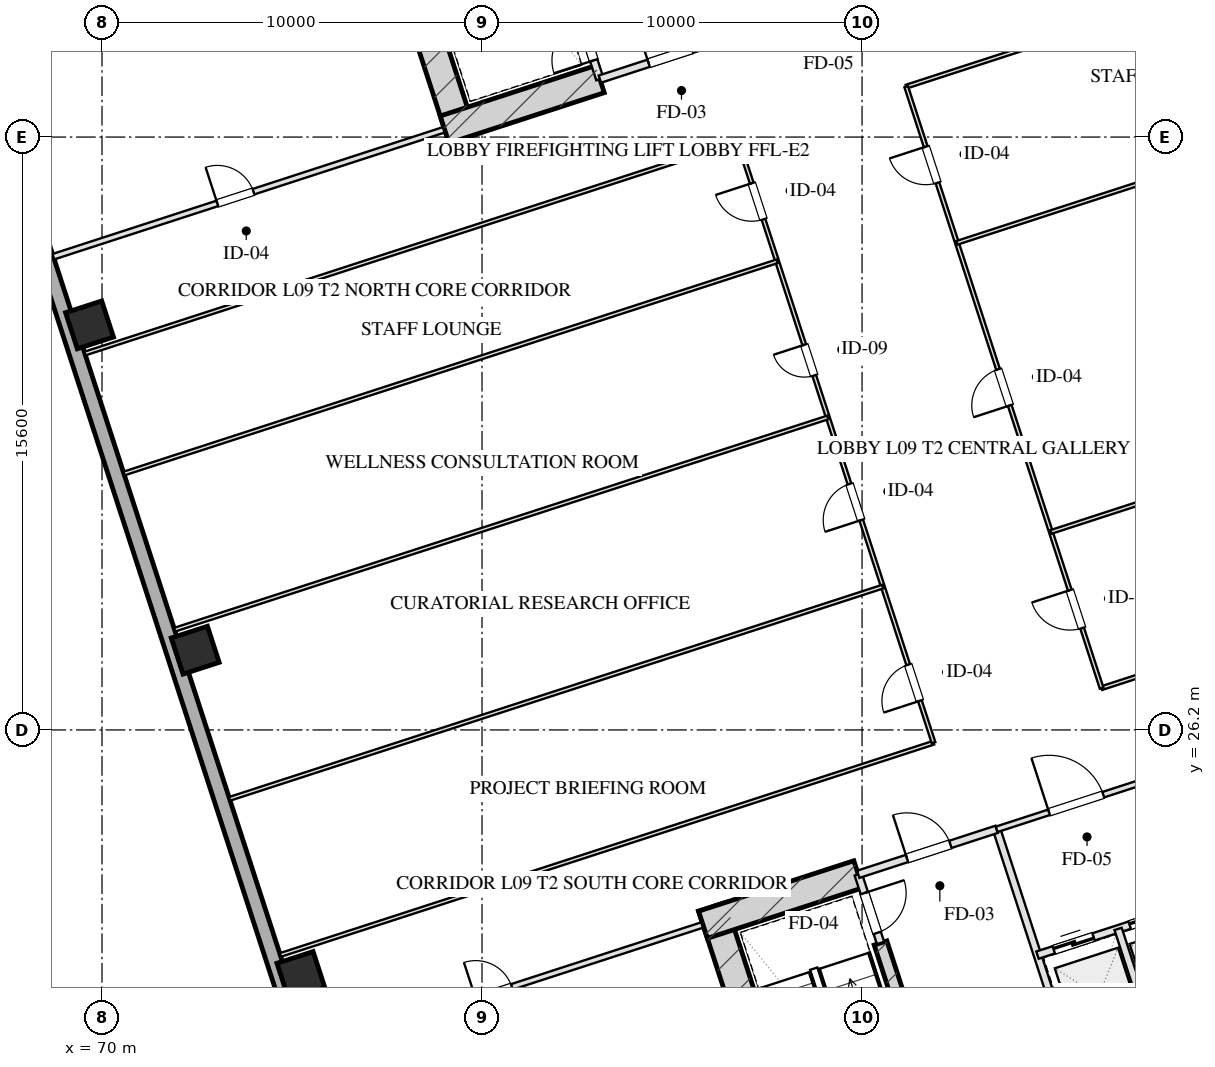
"""IFC4 building model, lengths in metres.
Left out: names, types, materials, properties, quantities, classifications, styles, units other than length and angle.
Written with IfcOpenShell. Run it as: python <this file> out.ifc"""

import sys

from ifc_helpers import new_model, si_unit, direction, frame, frame_2d, origin, origin_2d, place, context, subcontext, project, spatial, rectangle, hollow_rectangle, extrude, element, fill, save


model = new_model("IFC4")
c1 = context("Model", 3, precision=1e-05, world=origin(), true_north=direction((0.0, 1.0)))
c2 = subcontext(c1, "Body", "Model", "MODEL_VIEW")
j1 = project(units=[si_unit("LENGTHUNIT", "METRE"), si_unit("PLANEANGLEUNIT", "RADIAN")], contexts=[c1])
p1 = place(None, origin())
s1 = spatial("IfcSite", under=j1, at=p1, CompositionType="ELEMENT")
p2 = place(p1, origin())
s2 = spatial("IfcBuilding", under=s1, at=p2, CompositionType="ELEMENT")
p3 = place(p2, frame((0.0, 0.0, 42.0)))
s3 = spatial("IfcBuildingStorey", under=s2, at=p3, CompositionType="ELEMENT", Elevation=42.0)
p4 = place(p3, frame((86.055, 21.546, 0.0), z_axis=(0.0, 0.0, 1.0), x_axis=(0.309023585745, -0.951054374604, 0.0)))
e1 = element("IfcWall", 1, at=p4, inside=s3, PredefinedType="SHEAR", context=c2, shape_type="SweptSolid", body=[
    extrude(rectangle(XDim=9.63, YDim=0.75, at=frame_2d((4.815, 0.0))), origin(), (0.0, 0.0, 1.0), 4.0),
])
p5 = place(p3, frame((90.486, 20.594, 0.0), z_axis=(0.0, 0.0, 1.0), x_axis=(0.309020428229, -0.951055400562, 0.0)))
e2 = element("IfcWall", 2, at=p5, inside=s3, PredefinedType="SHEAR", context=c2, shape_type="SweptSolid", body=[
    extrude(rectangle(XDim=6.98, YDim=0.35, at=frame_2d((3.49, 0.0))), origin(), (0.0, 0.0, 1.0), 4.0),
])
p6 = place(p3, frame((85.814, 21.074, 0.0), z_axis=(0.0, 0.0, 1.0), x_axis=(0.95106580992, 0.308988390074, 0.0)))
e3 = element("IfcWall", 3, at=p6, inside=s3, PredefinedType="SHEAR", context=c2, shape_type="SweptSolid", body=[
    extrude(rectangle(XDim=4.295, YDim=0.75, at=frame_2d((2.147, 0.0))), origin(), (0.0, 0.0, 1.0), 4.0),
])
p7 = place(p3, frame((79.489, 41.756, 0.0), z_axis=(0.0, 0.0, 1.0), x_axis=(-0.309016134813, 0.951056795583, 0.0)))
e4 = element("IfcWall", 4, at=p7, inside=s3, PredefinedType="SHEAR", context=c2, shape_type="SweptSolid", body=[
    extrude(rectangle(XDim=9.63, YDim=0.75, at=frame_2d((4.815, 0.0))), origin(), (0.0, 0.0, 1.0), 4.0),
])
p8 = place(p3, frame((79.016, 41.997, 0.0), z_axis=(0.0, 0.0, 1.0), x_axis=(0.95106038264, 0.309005094736, 0.0)))
e5 = element("IfcWall", 5, at=p8, inside=s3, PredefinedType="SHEAR", context=c2, shape_type="SweptSolid", body=[
    extrude(rectangle(XDim=4.295, YDim=0.75, at=frame_2d((2.147, 0.0))), origin(), (0.0, 0.0, 1.0), 4.0),
])
for number, where, z_axis, x_axis in (
    (6, (75.234, 19.739, 0.0), (0.0, 0.0, 1.0), (0.951, 0.309, 0.0)),
    (7, (72.453, 28.299, 0.0), (0.0, 0.0, 1.0), (0.951, 0.309, 0.0)),
    (8, (69.672, 36.858, 0.0), (0.0, 0.0, 1.0), (0.951, 0.309, 0.0)),
):
    element("IfcColumn", number, at=place(p3, frame(where, z_axis=z_axis, x_axis=x_axis)), inside=s3, PredefinedType="COLUMN", context=c2, shape_type="SweptSolid", body=[
        extrude(hollow_rectangle(XDim=1.0, YDim=1.0, WallThickness=0.036, at=origin_2d()), origin(), (0.0, 0.0, 1.0), 4.001),
    ])
p9 = place(p3, frame((79.655, 4.352, 0.0), z_axis=(0.0, 0.0, 1.0), x_axis=(-0.309014526607, 0.951057318118, 0.0)))
e9 = element("IfcWall", 9, at=p9, inside=s3, PredefinedType="SOLIDWALL", context=c2, shape_type="SweptSolid", body=[
    extrude(rectangle(XDim=50.0, YDim=0.4, at=frame_2d((25.0, 0.0))), origin(), (0.0, 0.0, 1.0), 3.1),
])
p10 = place(p3, frame((89.899, 22.401, 0.0), z_axis=(0.0, 0.0, 1.0), x_axis=(0.308932062672, -0.951084108086, 0.0)))
e10 = element("IfcWall", 10, at=p10, inside=s3, PredefinedType="PARTITIONING", context=c2, shape_type="SweptSolid", body=[
    extrude(rectangle(XDim=1.9, YDim=0.2, at=frame_2d((0.95, 0.0))), origin(), (0.0, 0.0, 1.0), 3.705),
])
p11 = place(p10, frame((0.52, 0.0, 0.0)))
e11 = element("IfcOpeningElement", 11, at=p11, cuts=e10, PredefinedType="OPENING", context=c2, shape_type="SweptSolid", body=[
    extrude(rectangle(XDim=1.1, YDim=2.05, at=frame_2d((0.55, 1.025))), frame((0.0, 0.11, 0.0), z_axis=(0.0, -1.0, 0.0), x_axis=(1.0, 0.0, 0.0)), (0.0, 0.0, 1.0), 0.22),
])
p12 = place(p3, frame((93.542, 23.585, 0.0), z_axis=(0.0, 0.0, 1.0), x_axis=(0.309042196757, -0.951048327176, 0.0)))
e12 = element("IfcWall", 12, at=p12, inside=s3, PredefinedType="PARTITIONING", context=c2, shape_type="SweptSolid", body=[
    extrude(rectangle(XDim=8.43, YDim=0.2, at=frame_2d((4.215, 0.0))), origin(), (0.0, 0.0, 1.0), 3.705),
])
p13 = place(p3, frame((89.899, 22.401, 0.0), z_axis=(0.0, 0.0, 1.0), x_axis=(0.951046716504, 0.309047153403, 0.0)))
e13 = element("IfcWall", 13, at=p13, inside=s3, PredefinedType="PARTITIONING", context=c2, shape_type="SweptSolid", body=[
    extrude(rectangle(XDim=3.83, YDim=0.2, at=frame_2d((1.915, 0.0))), origin(), (0.0, 0.0, 1.0), 3.705),
])
p14 = place(p13, frame((1.35, 0.0, 0.0)))
e14 = element("IfcOpeningElement", 14, at=p14, cuts=e13, PredefinedType="OPENING", context=c2, shape_type="SweptSolid", body=[
    extrude(rectangle(XDim=1.2, YDim=2.05, at=frame_2d((0.6, 1.025))), frame((0.0, 0.11, 0.0), z_axis=(0.0, -1.0, 0.0), x_axis=(1.0, 0.0, 0.0)), (0.0, 0.0, 1.0), 0.22),
])
p15 = place(p3, frame((93.542, 23.585, 0.0), z_axis=(0.0, 0.0, 1.0), x_axis=(0.951063829732, 0.308994485023, 0.0)))
e15 = element("IfcWall", 15, at=p15, inside=s3, PredefinedType="PARTITIONING", context=c2, shape_type="SweptSolid", body=[
    extrude(rectangle(XDim=4.4, YDim=0.15, at=frame_2d((2.2, 0.0))), origin(), (0.0, 0.0, 1.0), 3.705),
])
p16 = place(p15, frame((1.45, 0.0, 0.0)))
e16 = element("IfcOpeningElement", 16, at=p16, cuts=e15, PredefinedType="OPENING", context=c2, shape_type="SweptSolid", body=[
    extrude(rectangle(XDim=1.5, YDim=2.05, at=frame_2d((0.75, 1.025))), frame((0.0, 0.085, 0.0), z_axis=(0.0, -1.0, 0.0), x_axis=(1.0, 0.0, 0.0)), (0.0, 0.0, 1.0), 0.17),
])
p17 = place(p3, frame((94.617, 20.275, 0.0), z_axis=(0.0, 0.0, 1.0), x_axis=(0.951058531764, 0.30901079133, 0.0)))
e17 = element("IfcWall", 17, at=p17, inside=s3, PredefinedType="PARTITIONING", context=c2, shape_type="SweptSolid", body=[
    extrude(rectangle(XDim=4.4, YDim=0.2, at=frame_2d((2.2, 0.0))), origin(), (0.0, 0.0, 1.0), 3.705),
])
p18 = place(p17, frame((0.45, 0.0, 0.0)))
e18 = element("IfcOpeningElement", 18, at=p18, cuts=e17, PredefinedType="OPENING", context=c2, shape_type="SweptSolid", body=[
    extrude(rectangle(XDim=1.1, YDim=2.05, at=frame_2d((0.55, 1.025))), frame((0.0, 0.11, 0.0), z_axis=(0.0, -1.0, 0.0), x_axis=(1.0, 0.0, 0.0)), (0.0, 0.0, 1.0), 0.22),
])
p19 = place(p17, frame((2.55, 0.0, 0.0)))
e19 = element("IfcOpeningElement", 19, at=p19, cuts=e17, PredefinedType="OPENING", context=c2, shape_type="SweptSolid", body=[
    extrude(rectangle(XDim=1.1, YDim=2.05, at=frame_2d((0.55, 1.025))), frame((0.0, 0.11, 0.0), z_axis=(0.0, -1.0, 0.0), x_axis=(1.0, 0.0, 0.0)), (0.0, 0.0, 1.0), 0.22),
])
p20 = place(p3, frame((96.738, 20.964, 0.0), z_axis=(0.0, 0.0, 1.0), x_axis=(0.309042578481, -0.951048203135, 0.0)))
e20 = element("IfcWall", 20, at=p20, inside=s3, PredefinedType="PARTITIONING", context=c2, shape_type="SweptSolid", body=[
    extrude(rectangle(XDim=4.95, YDim=0.2, at=frame_2d((2.475, 0.0))), origin(), (0.0, 0.0, 1.0), 3.705),
])
p21 = place(p3, frame((83.101, 43.324, 0.0), z_axis=(0.0, 0.0, 1.0), x_axis=(-0.309048298632, 0.951046344356, 0.0)))
e21 = element("IfcWall", 21, at=p21, inside=s3, PredefinedType="PARTITIONING", context=c2, shape_type="SweptSolid", body=[
    extrude(rectangle(XDim=1.9, YDim=0.2, at=frame_2d((0.95, 0.0))), origin(), (0.0, 0.0, 1.0), 3.705),
])
p22 = place(p21, frame((0.52, 0.0, 0.0)))
e22 = element("IfcOpeningElement", 22, at=p22, cuts=e21, PredefinedType="OPENING", context=c2, shape_type="SweptSolid", body=[
    extrude(rectangle(XDim=1.1, YDim=2.05, at=frame_2d((0.55, 1.025))), frame((0.0, 0.11, 0.0), z_axis=(0.0, -1.0, 0.0), x_axis=(1.0, 0.0, 0.0)), (0.0, 0.0, 1.0), 0.22),
])
p23 = place(p3, frame((83.101, 43.324, 0.0), z_axis=(0.0, 0.0, 1.0), x_axis=(0.951052804469, 0.309028417967, 0.0)))
e23 = element("IfcWall", 23, at=p23, inside=s3, PredefinedType="PARTITIONING", context=c2, shape_type="SweptSolid", body=[
    extrude(rectangle(XDim=3.83, YDim=0.2, at=frame_2d((1.915, 0.0))), origin(), (0.0, 0.0, 1.0), 3.705),
])
p24 = place(p23, frame((1.35, 0.0, 0.0)))
e24 = element("IfcOpeningElement", 24, at=p24, cuts=e23, PredefinedType="OPENING", context=c2, shape_type="SweptSolid", body=[
    extrude(rectangle(XDim=1.2, YDim=2.05, at=frame_2d((0.6, 1.025))), frame((0.0, 0.11, 0.0), z_axis=(0.0, -1.0, 0.0), x_axis=(1.0, 0.0, 0.0)), (0.0, 0.0, 1.0), 0.22),
])
p25 = place(p3, frame((75.519, 17.729, 0.0), z_axis=(0.0, 0.0, 1.0), x_axis=(0.951056658866, 0.309016555588, 0.0)))
e25 = element("IfcWall", 25, at=p25, inside=s3, PredefinedType="PARTITIONING", context=c2, shape_type="SweptSolid", body=[
    extrude(rectangle(XDim=10.8, YDim=0.15, at=frame_2d((5.4, 0.0))), origin(), (0.0, 0.0, 1.0), 3.705),
])
p26 = place(p25, frame((4.536, 0.0, 0.0)))
e26 = element("IfcOpeningElement", 26, at=p26, cuts=e25, PredefinedType="OPENING", context=c2, shape_type="SweptSolid", body=[
    extrude(rectangle(XDim=1.0, YDim=2.05, at=frame_2d((0.5, 1.025))), frame((0.0, 0.085, 0.0), z_axis=(0.0, -1.0, 0.0), x_axis=(1.0, 0.0, 0.0)), (0.0, 0.0, 1.0), 0.17),
])
p27 = place(p3, frame((68.721, 38.652, 0.0), z_axis=(0.0, 0.0, 1.0), x_axis=(0.951056658866, 0.309016555588, 0.0)))
e27 = element("IfcWall", 27, at=p27, inside=s3, PredefinedType="PARTITIONING", context=c2, shape_type="SweptSolid", body=[
    extrude(rectangle(XDim=10.8, YDim=0.15, at=frame_2d((5.4, 0.0))), origin(), (0.0, 0.0, 1.0), 3.705),
])
p28 = place(p27, frame((4.536, 0.0, 0.0)))
e28 = element("IfcOpeningElement", 28, at=p28, cuts=e27, PredefinedType="OPENING", context=c2, shape_type="SweptSolid", body=[
    extrude(rectangle(XDim=1.0, YDim=2.05, at=frame_2d((0.5, 1.025))), frame((0.0, 0.085, 0.0), z_axis=(0.0, -1.0, 0.0), x_axis=(1.0, 0.0, 0.0)), (0.0, 0.0, 1.0), 0.17),
])
p29 = place(p3, frame((74.691, 20.278, 0.0), z_axis=(0.0, 0.0, 1.0), x_axis=(0.951053521786, 0.309026210375, 0.0)))
e29 = element("IfcWall", 29, at=p29, inside=s3, PredefinedType="MOVABLE", context=c2, shape_type="SweptSolid", body=[
    extrude(rectangle(XDim=18.075, YDim=0.1, at=frame_2d((9.038, 0.0))), origin(), (0.0, 0.0, 1.0), 3.705),
])
p30 = place(p3, frame((96.304, 27.3, 0.0), z_axis=(0.0, 0.0, 1.0), x_axis=(0.951055535739, 0.309020012199, 0.0)))
e30 = element("IfcWall", 30, at=p30, inside=s3, PredefinedType="MOVABLE", context=c2, shape_type="SweptSolid", body=[
    extrude(rectangle(XDim=14.875, YDim=0.1, at=frame_2d((7.438, 0.0))), origin(), (0.0, 0.0, 1.0), 3.705),
])
p31 = place(p3, frame((69.549, 36.103, 0.0), z_axis=(0.0, 0.0, 1.0), x_axis=(0.951057491432, 0.309013993197, 0.0)))
e31 = element("IfcWall", 31, at=p31, inside=s3, PredefinedType="MOVABLE", context=c2, shape_type="SweptSolid", body=[
    extrude(rectangle(XDim=18.075, YDim=0.1, at=frame_2d((9.038, 0.0))), origin(), (0.0, 0.0, 1.0), 3.705),
])
p32 = place(p3, frame((91.162, 43.126, 0.0), z_axis=(0.0, 0.0, 1.0), x_axis=(0.951055535739, 0.309020012199, 0.0)))
e32 = element("IfcWall", 32, at=p32, inside=s3, PredefinedType="MOVABLE", context=c2, shape_type="SweptSolid", body=[
    extrude(rectangle(XDim=14.875, YDim=0.1, at=frame_2d((7.438, 0.0))), origin(), (0.0, 0.0, 1.0), 3.705),
])
p33 = place(p3, frame((91.882, 25.863, 0.0), z_axis=(0.0, 0.0, 1.0), x_axis=(-0.309022042254, 0.951054876125, 0.0)))
e33 = element("IfcWall", 33, at=p33, inside=s3, PredefinedType="MOVABLE", context=c2, shape_type="SweptSolid", body=[
    extrude(rectangle(XDim=16.64, YDim=0.1, at=frame_2d((8.32, 0.0))), origin(), (0.0, 0.0, 1.0), 3.705),
])
p34 = place(p33, frame((1.16, 0.0, 0.0)))
e34 = element("IfcOpeningElement", 34, at=p34, cuts=e33, PredefinedType="OPENING", context=c2, shape_type="SweptSolid", body=[
    extrude(rectangle(XDim=1.0, YDim=2.05, at=frame_2d((0.5, 1.025))), frame((0.0, 0.06, 0.0), z_axis=(0.0, -1.0, 0.0), x_axis=(1.0, 0.0, 0.0)), (0.0, 0.0, 1.0), 0.12),
])
p35 = place(p33, frame((6.16, 0.0, 0.0)))
e35 = element("IfcOpeningElement", 35, at=p35, cuts=e33, PredefinedType="OPENING", context=c2, shape_type="SweptSolid", body=[
    extrude(rectangle(XDim=1.0, YDim=2.05, at=frame_2d((0.5, 1.025))), frame((0.0, 0.06, 0.0), z_axis=(0.0, -1.0, 0.0), x_axis=(1.0, 0.0, 0.0)), (0.0, 0.0, 1.0), 0.12),
])
p36 = place(p33, frame((10.16, 0.0, 0.0)))
e36 = element("IfcOpeningElement", 36, at=p36, cuts=e33, PredefinedType="OPENING", context=c2, shape_type="SweptSolid", body=[
    extrude(rectangle(XDim=0.85, YDim=2.05, at=frame_2d((0.425, 1.025))), frame((0.0, 0.06, 0.0), z_axis=(0.0, -1.0, 0.0), x_axis=(1.0, 0.0, 0.0)), (0.0, 0.0, 1.0), 0.12),
])
p37 = place(p33, frame((14.48, 0.0, 0.0)))
e37 = element("IfcOpeningElement", 37, at=p37, cuts=e33, PredefinedType="OPENING", context=c2, shape_type="SweptSolid", body=[
    extrude(rectangle(XDim=1.0, YDim=2.05, at=frame_2d((0.5, 1.025))), frame((0.0, 0.06, 0.0), z_axis=(0.0, -1.0, 0.0), x_axis=(1.0, 0.0, 0.0)), (0.0, 0.0, 1.0), 0.12),
])
p38 = place(p3, frame((96.304, 27.3, 0.0), z_axis=(0.0, 0.0, 1.0), x_axis=(-0.30901773025, 0.951056277195, 0.0)))
e38 = element("IfcWall", 38, at=p38, inside=s3, PredefinedType="MOVABLE", context=c2, shape_type="SweptSolid", body=[
    extrude(rectangle(XDim=16.64, YDim=0.1, at=frame_2d((8.32, 0.0))), origin(), (0.0, 0.0, 1.0), 3.705),
])
p39 = place(p38, frame((1.66, 0.0, 0.0)))
e39 = element("IfcOpeningElement", 39, at=p39, cuts=e38, PredefinedType="OPENING", context=c2, shape_type="SweptSolid", body=[
    extrude(rectangle(XDim=1.05, YDim=2.05, at=frame_2d((0.525, 1.025))), frame((0.0, 0.06, 0.0), z_axis=(0.0, -1.0, 0.0), x_axis=(1.0, 0.0, 0.0)), (0.0, 0.0, 1.0), 0.12),
])
p40 = place(p38, frame((7.82, 0.0, 0.0)))
e40 = element("IfcOpeningElement", 40, at=p40, cuts=e38, PredefinedType="OPENING", context=c2, shape_type="SweptSolid", body=[
    extrude(rectangle(XDim=1.0, YDim=2.05, at=frame_2d((0.5, 1.025))), frame((0.0, 0.06, 0.0), z_axis=(0.0, -1.0, 0.0), x_axis=(1.0, 0.0, 0.0)), (0.0, 0.0, 1.0), 0.12),
])
p41 = place(p38, frame((13.98, 0.0, 0.0)))
e41 = element("IfcOpeningElement", 41, at=p41, cuts=e38, PredefinedType="OPENING", context=c2, shape_type="SweptSolid", body=[
    extrude(rectangle(XDim=1.0, YDim=2.05, at=frame_2d((0.5, 1.025))), frame((0.0, 0.06, 0.0), z_axis=(0.0, -1.0, 0.0), x_axis=(1.0, 0.0, 0.0)), (0.0, 0.0, 1.0), 0.12),
])
for number, where, z_axis, x_axis in (
    (42, (73.356, 24.386, 0.0), (0.0, 0.0, 1.0), (0.951, 0.309, 0.0)),
    (43, (71.91, 28.837, 0.0), (0.0, 0.0, 1.0), (0.951, 0.309, 0.0)),
    (44, (70.575, 32.946, 0.0), (0.0, 0.0, 1.0), (0.951, 0.309, 0.0)),
):
    element("IfcWall", number, at=place(p3, frame(where, z_axis=z_axis, x_axis=x_axis)), inside=s3, PredefinedType="MOVABLE", context=c2, shape_type="SweptSolid", body=[
        extrude(rectangle(XDim=18.075, YDim=0.1, at=frame_2d((9.038, 0.0))), origin(), (0.0, 0.0, 1.0), 3.705),
    ])
for number, where, z_axis, x_axis in (
    (45, (94.969, 31.409, 0.0), (0.0, 0.0, 1.0), (0.951, 0.309, 0.0)),
    (46, (92.497, 39.017, 0.0), (0.0, 0.0, 1.0), (0.951, 0.309, 0.0)),
):
    element("IfcWall", number, at=place(p3, frame(where, z_axis=z_axis, x_axis=x_axis)), inside=s3, PredefinedType="MOVABLE", context=c2, shape_type="SweptSolid", body=[
        extrude(rectangle(XDim=14.875, YDim=0.1, at=frame_2d((7.438, 0.0))), origin(), (0.0, 0.0, 1.0), 3.705),
    ])
p42 = place(p11, origin())
e47 = element("IfcDoor", 47, at=p42, inside=s3, OperationType="SINGLE_SWING_LEFT", PredefinedType="DOOR", context=c2, shape_type="SweptSolid", body=[
    extrude(rectangle(XDim=1.1, YDim=2.05, at=frame_2d((0.55, 1.025))), frame((0.0, 0.025, 0.0), z_axis=(0.0, -1.0, 0.0), x_axis=(1.0, 0.0, 0.0)), (0.0, 0.0, 1.0), 0.05),
])
fill(e11, e47)
p43 = place(p14, origin())
e48 = element("IfcDoor", 48, at=p43, inside=s3, OperationType="SINGLE_SWING_LEFT", PredefinedType="DOOR", context=c2, shape_type="SweptSolid", body=[
    extrude(rectangle(XDim=1.2, YDim=2.05, at=frame_2d((0.6, 1.025))), frame((0.0, 0.025, 0.0), z_axis=(0.0, -1.0, 0.0), x_axis=(1.0, 0.0, 0.0)), (0.0, 0.0, 1.0), 0.05),
])
fill(e14, e48)
p44 = place(p16, origin())
e49 = element("IfcDoor", 49, at=p44, inside=s3, OperationType="SINGLE_SWING_LEFT", PredefinedType="DOOR", context=c2, shape_type="SweptSolid", body=[
    extrude(rectangle(XDim=1.5, YDim=2.05, at=frame_2d((0.75, 1.025))), frame((0.0, 0.025, 0.0), z_axis=(0.0, -1.0, 0.0), x_axis=(1.0, 0.0, 0.0)), (0.0, 0.0, 1.0), 0.05),
])
fill(e16, e49)
p45 = place(p18, origin())
e50 = element("IfcDoor", 50, at=p45, inside=s3, OperationType="DOUBLE_DOOR_SLIDING", PredefinedType="DOOR", context=c2, shape_type="SweptSolid", body=[
    extrude(rectangle(XDim=1.1, YDim=2.05, at=frame_2d((0.55, 1.025))), frame((0.0, 0.025, 0.0), z_axis=(0.0, -1.0, 0.0), x_axis=(1.0, 0.0, 0.0)), (0.0, 0.0, 1.0), 0.05),
])
fill(e18, e50)
p46 = place(p19, origin())
e51 = element("IfcDoor", 51, at=p46, inside=s3, OperationType="DOUBLE_DOOR_SLIDING", PredefinedType="DOOR", context=c2, shape_type="SweptSolid", body=[
    extrude(rectangle(XDim=1.1, YDim=2.05, at=frame_2d((0.55, 1.025))), frame((0.0, 0.025, 0.0), z_axis=(0.0, -1.0, 0.0), x_axis=(1.0, 0.0, 0.0)), (0.0, 0.0, 1.0), 0.05),
])
fill(e19, e51)
p47 = place(p22, origin())
e52 = element("IfcDoor", 52, at=p47, inside=s3, OperationType="SINGLE_SWING_LEFT", PredefinedType="DOOR", context=c2, shape_type="SweptSolid", body=[
    extrude(rectangle(XDim=1.1, YDim=2.05, at=frame_2d((0.55, 1.025))), frame((0.0, 0.025, 0.0), z_axis=(0.0, -1.0, 0.0), x_axis=(1.0, 0.0, 0.0)), (0.0, 0.0, 1.0), 0.05),
])
fill(e22, e52)
p48 = place(p24, origin())
e53 = element("IfcDoor", 53, at=p48, inside=s3, OperationType="SINGLE_SWING_LEFT", PredefinedType="DOOR", context=c2, shape_type="SweptSolid", body=[
    extrude(rectangle(XDim=1.2, YDim=2.05, at=frame_2d((0.6, 1.025))), frame((0.0, 0.025, 0.0), z_axis=(0.0, -1.0, 0.0), x_axis=(1.0, 0.0, 0.0)), (0.0, 0.0, 1.0), 0.05),
])
fill(e24, e53)
p49 = place(p26, origin())
e54 = element("IfcDoor", 54, at=p49, inside=s3, OperationType="SINGLE_SWING_LEFT", PredefinedType="DOOR", context=c2, shape_type="SweptSolid", body=[
    extrude(rectangle(XDim=1.0, YDim=2.05, at=frame_2d((0.5, 1.025))), frame((0.0, 0.025, 0.0), z_axis=(0.0, -1.0, 0.0), x_axis=(1.0, 0.0, 0.0)), (0.0, 0.0, 1.0), 0.05),
])
fill(e26, e54)
p50 = place(p28, origin())
e55 = element("IfcDoor", 55, at=p50, inside=s3, OperationType="SINGLE_SWING_LEFT", PredefinedType="DOOR", context=c2, shape_type="SweptSolid", body=[
    extrude(rectangle(XDim=1.0, YDim=2.05, at=frame_2d((0.5, 1.025))), frame((0.0, 0.025, 0.0), z_axis=(0.0, -1.0, 0.0), x_axis=(1.0, 0.0, 0.0)), (0.0, 0.0, 1.0), 0.05),
])
fill(e28, e55)
p51 = place(p34, origin())
e56 = element("IfcDoor", 56, at=p51, inside=s3, OperationType="SINGLE_SWING_LEFT", PredefinedType="DOOR", context=c2, shape_type="SweptSolid", body=[
    extrude(rectangle(XDim=1.0, YDim=2.05, at=frame_2d((0.5, 1.025))), frame((0.0, 0.025, 0.0), z_axis=(0.0, -1.0, 0.0), x_axis=(1.0, 0.0, 0.0)), (0.0, 0.0, 1.0), 0.05),
])
fill(e34, e56)
p52 = place(p35, origin())
e57 = element("IfcDoor", 57, at=p52, inside=s3, OperationType="SINGLE_SWING_LEFT", PredefinedType="DOOR", context=c2, shape_type="SweptSolid", body=[
    extrude(rectangle(XDim=1.0, YDim=2.05, at=frame_2d((0.5, 1.025))), frame((0.0, 0.025, 0.0), z_axis=(0.0, -1.0, 0.0), x_axis=(1.0, 0.0, 0.0)), (0.0, 0.0, 1.0), 0.05),
])
fill(e35, e57)
p53 = place(p36, origin())
e58 = element("IfcDoor", 58, at=p53, inside=s3, OperationType="SINGLE_SWING_RIGHT", PredefinedType="DOOR", context=c2, shape_type="SweptSolid", body=[
    extrude(rectangle(XDim=0.85, YDim=2.05, at=frame_2d((0.425, 1.025))), frame((0.0, 0.025, 0.0), z_axis=(0.0, -1.0, 0.0), x_axis=(1.0, 0.0, 0.0)), (0.0, 0.0, 1.0), 0.05),
])
fill(e36, e58)
p54 = place(p37, origin())
e59 = element("IfcDoor", 59, at=p54, inside=s3, OperationType="SINGLE_SWING_RIGHT", PredefinedType="DOOR", context=c2, shape_type="SweptSolid", body=[
    extrude(rectangle(XDim=1.0, YDim=2.05, at=frame_2d((0.5, 1.025))), frame((0.0, 0.025, 0.0), z_axis=(0.0, -1.0, 0.0), x_axis=(1.0, 0.0, 0.0)), (0.0, 0.0, 1.0), 0.05),
])
fill(e37, e59)
p55 = place(p39, origin())
e60 = element("IfcDoor", 60, at=p55, inside=s3, OperationType="SINGLE_SWING_RIGHT", PredefinedType="DOOR", context=c2, shape_type="SweptSolid", body=[
    extrude(rectangle(XDim=1.05, YDim=2.05, at=frame_2d((0.525, 1.025))), frame((0.0, 0.025, 0.0), z_axis=(0.0, -1.0, 0.0), x_axis=(1.0, 0.0, 0.0)), (0.0, 0.0, 1.0), 0.05),
])
fill(e39, e60)
p56 = place(p40, origin())
e61 = element("IfcDoor", 61, at=p56, inside=s3, OperationType="SINGLE_SWING_LEFT", PredefinedType="DOOR", context=c2, shape_type="SweptSolid", body=[
    extrude(rectangle(XDim=1.0, YDim=2.05, at=frame_2d((0.5, 1.025))), frame((0.0, 0.025, 0.0), z_axis=(0.0, -1.0, 0.0), x_axis=(1.0, 0.0, 0.0)), (0.0, 0.0, 1.0), 0.05),
])
fill(e40, e61)
p57 = place(p41, origin())
e62 = element("IfcDoor", 62, at=p57, inside=s3, OperationType="SINGLE_SWING_RIGHT", PredefinedType="DOOR", context=c2, shape_type="SweptSolid", body=[
    extrude(rectangle(XDim=1.0, YDim=2.05, at=frame_2d((0.5, 1.025))), frame((0.0, 0.025, 0.0), z_axis=(0.0, -1.0, 0.0), x_axis=(1.0, 0.0, 0.0)), (0.0, 0.0, 1.0), 0.05),
])
fill(e41, e62)
save(model, sys.argv[1])
